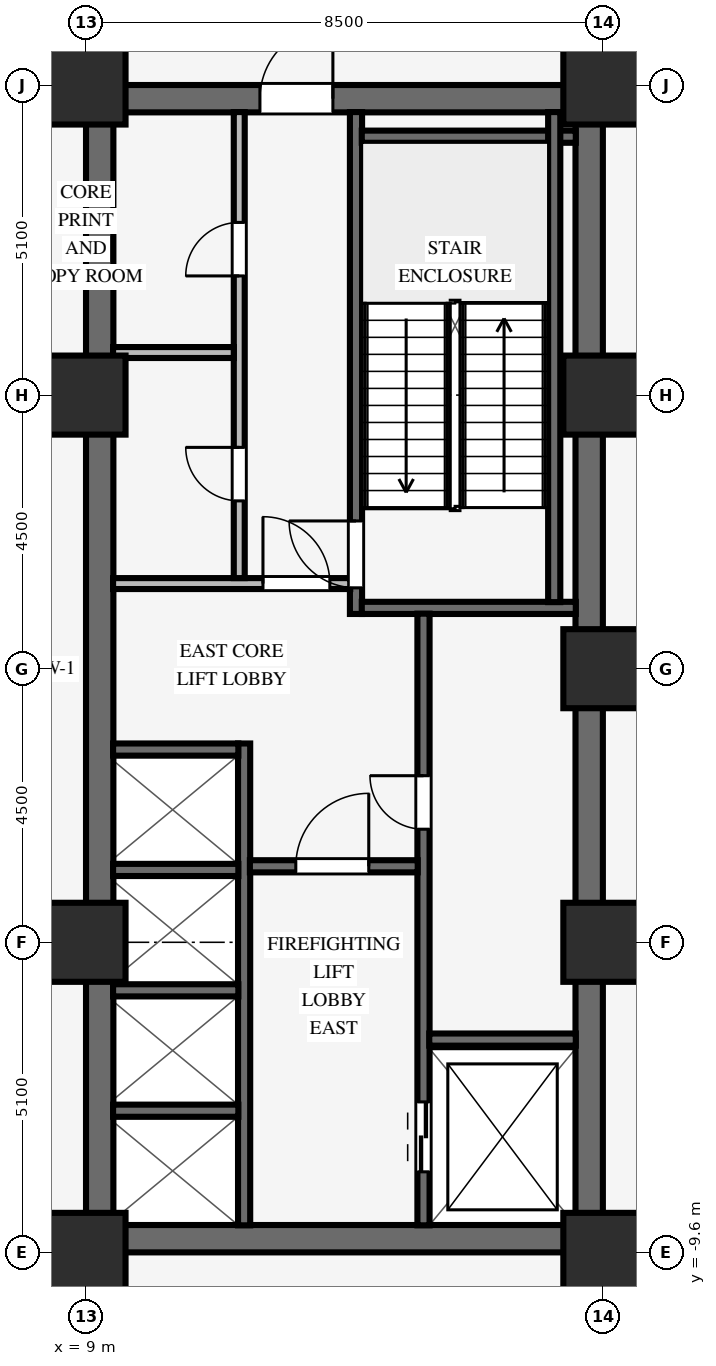
"""IFC4 building model, lengths in metres.
Left out: names, types, materials, properties, quantities, classifications, styles, units other than length and angle.
Written with IfcOpenShell. Run it as: python <this file> out.ifc"""

import sys

from ifc_helpers import new_model, si_unit, direction, frame, frame_2d, origin, origin_2d, place, context, subcontext, project, spatial, rectangle, extrude, source, transform, mapped, element, fill, save


model = new_model("IFC4")
c1 = context("Model", 3, precision=1e-05, world=origin(), true_north=direction((0.0, 1.0)))
c2 = subcontext(c1, "Body", "Model", "MODEL_VIEW")
j1 = project(units=[si_unit("LENGTHUNIT", "METRE"), si_unit("PLANEANGLEUNIT", "RADIAN")], contexts=[c1])
p1 = place(None, origin())
s1 = spatial("IfcSite", under=j1, at=p1, CompositionType="ELEMENT")
p2 = place(p1, origin())
s2 = spatial("IfcBuilding", under=s1, at=p2, CompositionType="ELEMENT")
p3 = place(p2, frame((0.0, 0.0, 13.8)))
s3 = spatial("IfcBuildingStorey", under=s2, at=p3, CompositionType="ELEMENT", Elevation=13.8)
p4 = place(p3, frame((9.0, -9.375, 0.0), z_axis=(0.0, 0.0, 1.0), x_axis=(1.0, 0.0, 0.0)))
e1 = element("IfcWall", 1, at=p4, inside=s3, PredefinedType="SHEAR", context=c2, shape_type="SweptSolid", body=[
    extrude(rectangle(XDim=8.5, YDim=0.45, at=frame_2d((4.25, 0.0))), origin(), (0.0, 0.0, 1.0), 4.2),
])
p5 = place(p3, frame((9.0, 9.375, 0.0), z_axis=(0.0, 0.0, 1.0), x_axis=(1.0, 0.0, 0.0)))
e2 = element("IfcWall", 2, at=p5, inside=s3, PredefinedType="SHEAR", context=c2, shape_type="SweptSolid", body=[
    extrude(rectangle(XDim=8.5, YDim=0.45, at=frame_2d((4.25, 0.0))), origin(), (0.0, 0.0, 1.0), 4.2),
])
p6 = place(p5, frame((2.86, 0.0, 0.0)))
e3 = element("IfcOpeningElement", 3, at=p6, cuts=e2, PredefinedType="OPENING", context=c2, shape_type="SweptSolid", body=[
    extrude(rectangle(XDim=1.2, YDim=2.15, at=frame_2d((0.6, 1.075))), frame((0.0, 0.235, 0.0), z_axis=(0.0, -1.0, 0.0), x_axis=(1.0, 0.0, 0.0)), (0.0, 0.0, 1.0), 0.47),
])
for number, where, z_axis, x_axis in (
    (4, (9.225, -9.155, 0.0), (0.0, 0.0, 1.0), (0.0, 1.0, 0.0)),
    (5, (17.275, -9.155, 0.0), (0.0, 0.0, 1.0), (0.0, 1.0, 0.0)),
):
    element("IfcWall", number, at=place(p3, frame(where, z_axis=z_axis, x_axis=x_axis)), inside=s3, PredefinedType="SHEAR", context=c2, shape_type="SweptSolid", body=[
        extrude(rectangle(XDim=18.31, YDim=0.45, at=frame_2d((9.155, 0.0))), origin(), (0.0, 0.0, 1.0), 4.2),
    ])
for number, where, z_axis, x_axis in (
    (6, (9.0, -9.6, 0.0), (0.0, 0.0, 1.0), (1.0, 0.0, 0.0)),
    (7, (9.0, -4.5, 0.0), (0.0, 0.0, 1.0), (1.0, 0.0, 0.0)),
    (8, (9.0, 4.5, 0.0), (0.0, 0.0, 1.0), (1.0, 0.0, 0.0)),
    (9, (9.0, 9.6, 0.0), (0.0, 0.0, 1.0), (1.0, 0.0, 0.0)),
    (10, (17.5, -9.6, 0.0), (0.0, 0.0, 1.0), (1.0, 0.0, 0.0)),
    (11, (17.5, -4.5, 0.0), (0.0, 0.0, 1.0), (1.0, 0.0, 0.0)),
    (12, (17.5, 4.5, 0.0), (0.0, 0.0, 1.0), (1.0, 0.0, 0.0)),
    (13, (17.5, 9.6, 0.0), (0.0, 0.0, 1.0), (1.0, 0.0, 0.0)),
    (14, (17.5, 0.0, 0.0), (0.0, 0.0, 1.0), (1.0, 0.0, 0.0)),
):
    element("IfcColumn", number, at=place(p3, frame(where, z_axis=z_axis, x_axis=x_axis)), inside=s3, PredefinedType="COLUMN", context=c2, shape_type="SweptSolid", body=[
        extrude(rectangle(XDim=1.3, YDim=1.3, at=origin_2d()), origin(), (0.0, 0.0, 1.0), 4.2),
    ])
p7 = place(p3, frame((13.44, 0.9, 0.0), z_axis=(0.0, 0.0, 1.0), x_axis=(0.0, 1.0, 0.0)))
e15 = element("IfcWall", 15, at=p7, inside=s3, PredefinedType="SHEAR", context=c2, shape_type="SweptSolid", body=[
    extrude(rectangle(XDim=8.255, YDim=0.2, at=frame_2d((4.127, 0.0))), origin(), (0.0, 0.0, 1.0), 4.2),
])
p8 = place(p7, frame((0.43, 0.0, 0.0)))
e16 = element("IfcOpeningElement", 16, at=p8, cuts=e15, PredefinedType="OPENING", context=c2, shape_type="SweptSolid", body=[
    extrude(rectangle(XDim=1.1, YDim=2.15, at=frame_2d((0.55, 1.075))), frame((0.0, 0.11, 0.0), z_axis=(0.0, -1.0, 0.0), x_axis=(1.0, 0.0, 0.0)), (0.0, 0.0, 1.0), 0.22),
])
for number, where, z_axis, x_axis in (
    (17, (13.535, 1.0, 0.0), (0.0, 0.0, 1.0), (1.0, 0.0, 0.0)),
    (18, (13.535, 8.75, 0.0), (0.0, 0.0, 1.0), (1.0, 0.0, 0.0)),
):
    element("IfcWall", number, at=place(p3, frame(where, z_axis=z_axis, x_axis=x_axis)), inside=s3, PredefinedType="SHEAR", context=c2, shape_type="SweptSolid", body=[
        extrude(rectangle(XDim=3.52, YDim=0.2, at=frame_2d((1.76, 0.0))), origin(), (0.0, 0.0, 1.0), 4.2),
    ])
p9 = place(p3, frame((16.7, 1.095, 0.0), z_axis=(0.0, 0.0, 1.0), x_axis=(0.0, 1.0, 0.0)))
e19 = element("IfcWall", 19, at=p9, inside=s3, PredefinedType="SHEAR", context=c2, shape_type="SweptSolid", body=[
    extrude(rectangle(XDim=8.06, YDim=0.2, at=frame_2d((4.03, 0.0))), origin(), (0.0, 0.0, 1.0), 4.2),
])
p10 = place(p3, frame((14.55, -9.155, 0.0), z_axis=(0.0, 0.0, 1.0), x_axis=(0.0, 1.0, 0.0)))
e20 = element("IfcWall", 20, at=p10, inside=s3, PredefinedType="SHEAR", context=c2, shape_type="SweptSolid", body=[
    extrude(rectangle(XDim=10.06, YDim=0.2, at=frame_2d((5.03, 0.0))), origin(), (0.0, 0.0, 1.0), 4.2),
])
p11 = place(p10, frame((6.515, 0.0, 0.0)))
e21 = element("IfcOpeningElement", 21, at=p11, cuts=e20, PredefinedType="OPENING", context=c2, shape_type="SweptSolid", body=[
    extrude(rectangle(XDim=0.88, YDim=2.1, at=frame_2d((0.44, 1.05))), frame((0.0, 0.11, 0.0), z_axis=(0.0, -1.0, 0.0), x_axis=(1.0, 0.0, 0.0)), (0.0, 0.0, 1.0), 0.22),
])
p12 = place(p10, frame((0.88, 0.0, 0.0)))
e22 = element("IfcOpeningElement", 22, at=p12, cuts=e20, PredefinedType="OPENING", context=c2, shape_type="SweptSolid", body=[
    extrude(rectangle(XDim=1.15, YDim=2.15, at=frame_2d((0.575, 1.075))), frame((0.0, 0.11, 0.0), z_axis=(0.0, -1.0, 0.0), x_axis=(1.0, 0.0, 0.0)), (0.0, 0.0, 1.0), 0.22),
])
p13 = place(p3, frame((14.645, -6.1, 0.0), z_axis=(0.0, 0.0, 1.0), x_axis=(1.0, 0.0, 0.0)))
e23 = element("IfcWall", 23, at=p13, inside=s3, PredefinedType="SHEAR", context=c2, shape_type="SweptSolid", body=[
    extrude(rectangle(XDim=2.41, YDim=0.2, at=frame_2d((1.205, 0.0))), origin(), (0.0, 0.0, 1.0), 4.2),
])
p14 = place(p3, frame((11.6, -9.155, 0.0), z_axis=(0.0, 0.0, 1.0), x_axis=(0.0, 1.0, 0.0)))
e24 = element("IfcWall", 24, at=p14, inside=s3, PredefinedType="SHEAR", context=c2, shape_type="SweptSolid", body=[
    extrude(rectangle(XDim=7.925, YDim=0.2, at=frame_2d((3.962, 0.0))), origin(), (0.0, 0.0, 1.0), 4.2),
])
p15 = place(p3, frame((11.695, -3.25, 0.0), z_axis=(0.0, 0.0, 1.0), x_axis=(1.0, 0.0, 0.0)))
e25 = element("IfcWall", 25, at=p15, inside=s3, PredefinedType="SHEAR", context=c2, shape_type="SweptSolid", body=[
    extrude(rectangle(XDim=2.76, YDim=0.2, at=frame_2d((1.38, 0.0))), origin(), (0.0, 0.0, 1.0), 4.2),
])
p16 = place(p15, frame((0.755, 0.0, 0.0)))
e26 = element("IfcOpeningElement", 26, at=p16, cuts=e25, PredefinedType="OPENING", context=c2, shape_type="SweptSolid", body=[
    extrude(rectangle(XDim=1.2, YDim=2.15, at=frame_2d((0.6, 1.075))), frame((0.0, 0.11, 0.0), z_axis=(0.0, -1.0, 0.0), x_axis=(1.0, 0.0, 0.0)), (0.0, 0.0, 1.0), 0.22),
])
for number, where, z_axis, x_axis in (
    (27, (9.445, -7.27, 0.0), (0.0, 0.0, 1.0), (1.0, 0.0, 0.0)),
    (28, (9.445, -5.29, 0.0), (0.0, 0.0, 1.0), (1.0, 0.0, 0.0)),
    (29, (9.445, -3.31, 0.0), (0.0, 0.0, 1.0), (1.0, 0.0, 0.0)),
    (30, (9.445, -1.33, 0.0), (0.0, 0.0, 1.0), (1.0, 0.0, 0.0)),
):
    element("IfcWall", number, at=place(p3, frame(where, z_axis=z_axis, x_axis=x_axis)), inside=s3, PredefinedType="SHEAR", context=c2, shape_type="SweptSolid", body=[
        extrude(rectangle(XDim=2.06, YDim=0.2, at=frame_2d((1.03, 0.0))), origin(), (0.0, 0.0, 1.0), 4.2),
    ])
p17 = place(p3, frame((9.445, 1.4, 0.0), z_axis=(0.0, 0.0, 1.0), x_axis=(1.0, 0.0, 0.0)))
e31 = element("IfcWall", 31, at=p17, inside=s3, PredefinedType="PARTITIONING", context=c2, shape_type="SweptSolid", body=[
    extrude(rectangle(XDim=3.9, YDim=0.18, at=frame_2d((1.95, 0.0))), origin(), (0.0, 0.0, 1.0), 4.19),
])
p18 = place(p17, frame((2.465, 0.0, 0.0)))
e32 = element("IfcOpeningElement", 32, at=p18, cuts=e31, PredefinedType="OPENING", context=c2, shape_type="SweptSolid", body=[
    extrude(rectangle(XDim=1.1, YDim=2.15, at=frame_2d((0.55, 1.075))), frame((0.0, 0.1, 0.0), z_axis=(0.0, -1.0, 0.0), x_axis=(1.0, 0.0, 0.0)), (0.0, 0.0, 1.0), 0.2),
])
p19 = place(p3, frame((11.52, 1.49, 0.0), z_axis=(0.0, 0.0, 1.0), x_axis=(0.0, 1.0, 0.0)))
e33 = element("IfcWall", 33, at=p19, inside=s3, PredefinedType="PARTITIONING", context=c2, shape_type="SweptSolid", body=[
    extrude(rectangle(XDim=7.665, YDim=0.18, at=frame_2d((3.833, 0.0))), origin(), (0.0, 0.0, 1.0), 4.19),
])
p20 = place(p19, frame((1.27, 0.0, 0.0)))
e34 = element("IfcOpeningElement", 34, at=p20, cuts=e33, PredefinedType="OPENING", context=c2, shape_type="SweptSolid", body=[
    extrude(rectangle(XDim=0.88, YDim=2.1, at=frame_2d((0.44, 1.05))), frame((0.0, 0.1, 0.0), z_axis=(0.0, -1.0, 0.0), x_axis=(1.0, 0.0, 0.0)), (0.0, 0.0, 1.0), 0.2),
])
p21 = place(p19, frame((4.97, 0.0, 0.0)))
e35 = element("IfcOpeningElement", 35, at=p21, cuts=e33, PredefinedType="OPENING", context=c2, shape_type="SweptSolid", body=[
    extrude(rectangle(XDim=0.88, YDim=2.1, at=frame_2d((0.44, 1.05))), frame((0.0, 0.1, 0.0), z_axis=(0.0, -1.0, 0.0), x_axis=(1.0, 0.0, 0.0)), (0.0, 0.0, 1.0), 0.2),
])
p22 = place(p3, frame((9.445, 5.2, 0.0), z_axis=(0.0, 0.0, 1.0), x_axis=(1.0, 0.0, 0.0)))
e36 = element("IfcWall", 36, at=p22, inside=s3, PredefinedType="PARTITIONING", context=c2, shape_type="SweptSolid", body=[
    extrude(rectangle(XDim=1.985, YDim=0.18, at=frame_2d((0.992, 0.0))), origin(), (0.0, 0.0, 1.0), 4.19),
])
m1 = source(origin(), c2, "Body", "SweptSolid", [
    extrude(rectangle(XDim=1.1, YDim=2.15, at=frame_2d((0.55, 1.075))), frame((0.0, 0.025, 0.0), z_axis=(0.0, -1.0, 0.0), x_axis=(1.0, 0.0, 0.0)), (0.0, 0.0, 1.0), 0.05),
])
p23 = place(p8, origin())
e37 = element("IfcDoor", 37, at=p23, inside=s3, OperationType="SINGLE_SWING_RIGHT", PredefinedType="DOOR", context=c2, shape_type="MappedRepresentation", body=[
    mapped(m1, transform((0.0, 0.0, 0.0), scale=1.0)),
])
fill(e16, e37)
m2 = source(origin(), c2, "Body", "SweptSolid", [
    extrude(rectangle(XDim=0.88, YDim=2.1, at=frame_2d((0.44, 1.05))), frame((0.0, 0.025, 0.0), z_axis=(0.0, -1.0, 0.0), x_axis=(1.0, 0.0, 0.0)), (0.0, 0.0, 1.0), 0.05),
])
p24 = place(p11, origin())
e38 = element("IfcDoor", 38, at=p24, inside=s3, OperationType="SINGLE_SWING_RIGHT", PredefinedType="DOOR", context=c2, shape_type="MappedRepresentation", body=[
    mapped(m2, transform((0.0, 0.0, 0.0), scale=1.0)),
])
fill(e21, e38)
m3 = source(origin(), c2, "Body", "SweptSolid", [
    extrude(rectangle(XDim=1.2, YDim=2.15, at=frame_2d((0.6, 1.075))), frame((0.0, 0.025, 0.0), z_axis=(0.0, -1.0, 0.0), x_axis=(1.0, 0.0, 0.0)), (0.0, 0.0, 1.0), 0.05),
])
p25 = place(p16, origin())
e39 = element("IfcDoor", 39, at=p25, inside=s3, OperationType="SINGLE_SWING_RIGHT", PredefinedType="DOOR", context=c2, shape_type="MappedRepresentation", body=[
    mapped(m3, transform((0.0, 0.0, 0.0), scale=1.0)),
])
fill(e26, e39)
p26 = place(p6, origin())
e40 = element("IfcDoor", 40, at=p26, inside=s3, OperationType="SINGLE_SWING_RIGHT", PredefinedType="DOOR", context=c2, shape_type="MappedRepresentation", body=[
    mapped(m3, transform((0.0, 0.0, 0.0), scale=1.0)),
])
fill(e3, e40)
p27 = place(p18, origin())
e41 = element("IfcDoor", 41, at=p27, inside=s3, OperationType="SINGLE_SWING_LEFT", PredefinedType="DOOR", context=c2, shape_type="MappedRepresentation", body=[
    mapped(m1, transform((0.0, 0.0, 0.0), scale=1.0)),
])
fill(e32, e41)
p28 = place(p20, origin())
e42 = element("IfcDoor", 42, at=p28, inside=s3, OperationType="SINGLE_SWING_RIGHT", PredefinedType="DOOR", context=c2, shape_type="MappedRepresentation", body=[
    mapped(m2, transform((0.0, 0.0, 0.0), scale=1.0)),
])
fill(e34, e42)
p29 = place(p21, origin())
e43 = element("IfcDoor", 43, at=p29, inside=s3, OperationType="SINGLE_SWING_LEFT", PredefinedType="DOOR", context=c2, shape_type="MappedRepresentation", body=[
    mapped(m2, transform((0.0, 0.0, 0.0), scale=1.0)),
])
fill(e35, e43)
m4 = source(origin(), c2, "Body", "SweptSolid", [
    extrude(rectangle(XDim=1.15, YDim=2.15, at=frame_2d((0.575, 1.075))), frame((0.0, 0.025, 0.0), z_axis=(0.0, -1.0, 0.0), x_axis=(1.0, 0.0, 0.0)), (0.0, 0.0, 1.0), 0.05),
])
p30 = place(p12, origin())
e44 = element("IfcDoor", 44, at=p30, inside=s3, OperationType="DOUBLE_DOOR_SLIDING", PredefinedType="DOOR", context=c2, shape_type="MappedRepresentation", body=[
    mapped(m4, transform((0.0, 0.0, 0.0), scale=1.0)),
])
fill(e22, e44)
save(model, sys.argv[1])
